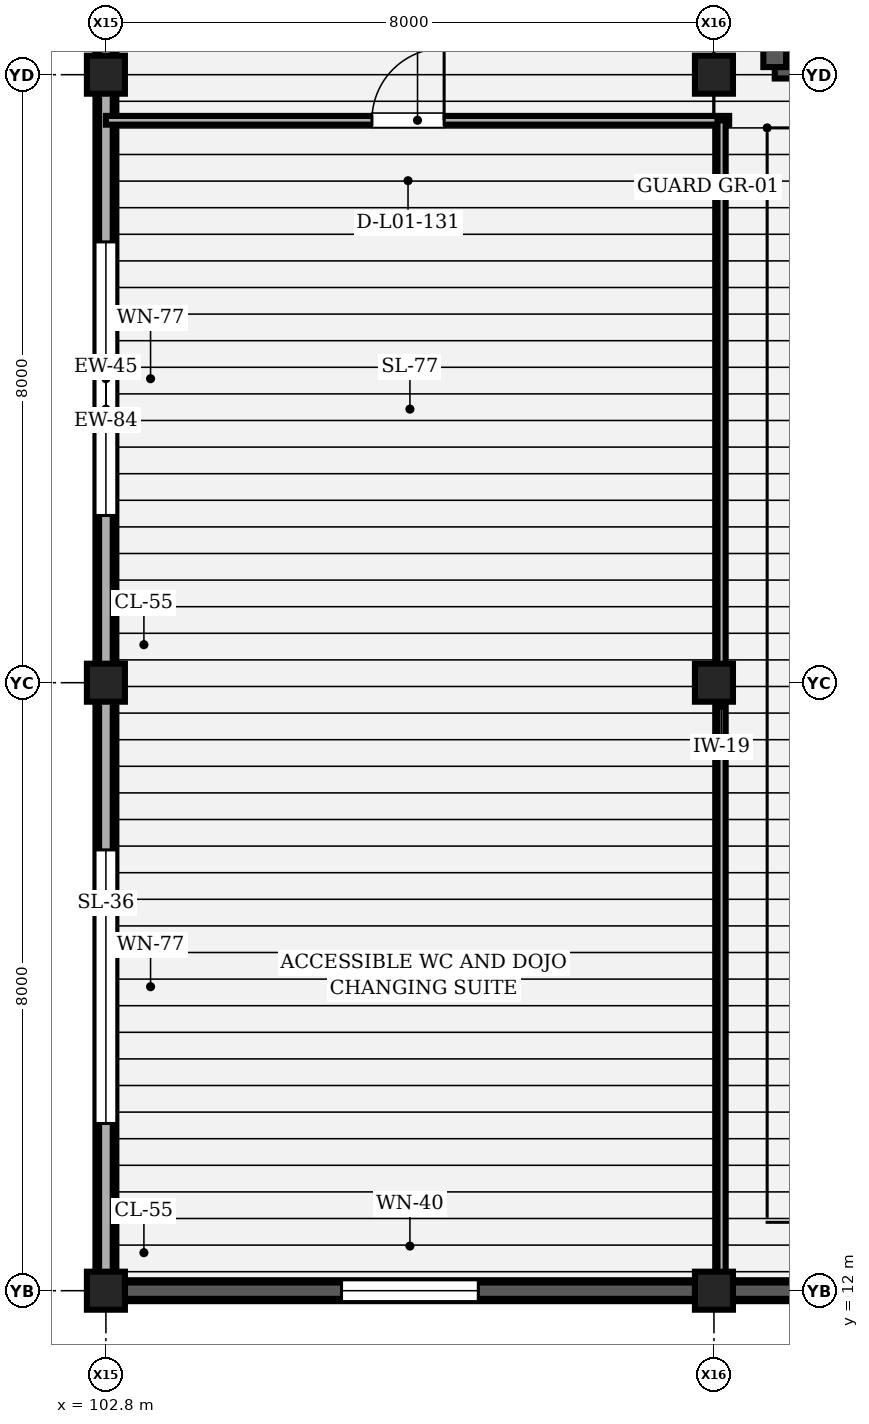
"""IFC4 building model, lengths in metres.
Left out: names, types, materials, properties, quantities, classifications, styles, units other than length and angle.
Written with IfcOpenShell. Run it as: python <this file> out.ifc"""

import sys

from ifc_helpers import new_model, si_unit, direction, frame, frame_2d, origin, origin_2d, place, context, subcontext, project, spatial, polyline, rectangle, outline, extrude, element, fill, save


model = new_model("IFC4")
c1 = context("Model", 3, precision=1e-05, world=origin(), true_north=direction((0.0, 1.0)))
c2 = subcontext(c1, "Body", "Model", "MODEL_VIEW")
j1 = project(units=[si_unit("LENGTHUNIT", "METRE"), si_unit("PLANEANGLEUNIT", "RADIAN")], contexts=[c1])
p1 = place(None, origin())
s1 = spatial("IfcSite", under=j1, at=p1, CompositionType="ELEMENT")
p2 = place(p1, origin())
s2 = spatial("IfcBuilding", under=s1, at=p2, CompositionType="ELEMENT")
p3 = place(p2, frame((0.0, 0.0, 4.8)))
s3 = spatial("IfcBuildingStorey", under=s2, at=p3, CompositionType="ELEMENT", Elevation=4.8)
for number, where, z_axis, x_axis in (
    (1, (102.8, 12.0, 0.0), (0.0, 0.0, 1.0), (1.0, 0.0, 0.0)),
    (2, (102.8, 20.0, 0.0), (0.0, 0.0, 1.0), (1.0, 0.0, 0.0)),
    (3, (102.8, 28.0, 0.0), (0.0, 0.0, 1.0), (1.0, 0.0, 0.0)),
    (4, (110.8, 12.0, 0.0), (0.0, 0.0, 1.0), (1.0, 0.0, 0.0)),
    (5, (110.8, 20.0, 0.0), (0.0, 0.0, 1.0), (1.0, 0.0, 0.0)),
    (6, (110.8, 28.0, 0.0), (0.0, 0.0, 1.0), (1.0, 0.0, 0.0)),
):
    element("IfcColumn", number, at=place(p3, frame(where, z_axis=z_axis, x_axis=x_axis)), inside=s3, PredefinedType="COLUMN", context=c2, shape_type="SweptSolid", body=[
        extrude(rectangle(XDim=0.5, YDim=0.5, at=origin_2d()), origin(), (0.0, 0.0, 1.0), 4.2),
    ])
p4 = place(p3, frame((103.05, 12.0, 0.0), z_axis=(0.0, 0.0, 1.0), x_axis=(1.0, 0.0, 0.0)))
e7 = element("IfcWall", 7, at=p4, inside=s3, PredefinedType="SOLIDWALL", context=c2, shape_type="SweptSolid", body=[
    extrude(rectangle(XDim=7.5, YDim=0.275, at=frame_2d((3.75, 0.0))), origin(), (0.0, 0.0, 1.0), 3.333),
])
p5 = place(p4, frame((2.85, 0.0, 1.6)))
e8 = element("IfcOpeningElement", 8, at=p5, cuts=e7, PredefinedType="OPENING", context=c2, shape_type="SweptSolid", body=[
    extrude(rectangle(XDim=1.8, YDim=0.75, at=frame_2d((0.9, 0.375))), frame((0.0, 0.147, 0.0), z_axis=(0.0, -1.0, 0.0), x_axis=(1.0, 0.0, 0.0)), (0.0, 0.0, 1.0), 0.295),
])
p6 = place(p3, frame((111.05, 12.0, 0.0), z_axis=(0.0, 0.0, 1.0), x_axis=(1.0, 0.0, 0.0)))
e9 = element("IfcWall", 9, at=p6, inside=s3, PredefinedType="SOLIDWALL", context=c2, shape_type="SweptSolid", body=[
    extrude(rectangle(XDim=7.5, YDim=0.275, at=frame_2d((3.75, 0.0))), origin(), (0.0, 0.0, 1.0), 3.333),
])
p7 = place(p6, frame((2.85, 0.0, 1.6)))
e10 = element("IfcOpeningElement", 10, at=p7, cuts=e9, PredefinedType="OPENING", context=c2, shape_type="SweptSolid", body=[
    extrude(rectangle(XDim=1.8, YDim=0.75, at=frame_2d((0.9, 0.375))), frame((0.0, 0.147, 0.0), z_axis=(0.0, -1.0, 0.0), x_axis=(1.0, 0.0, 0.0)), (0.0, 0.0, 1.0), 0.295),
])
p8 = place(p3, frame((102.8, 34.95, 0.0), z_axis=(0.0, 0.0, 1.0), x_axis=(0.0, -1.0, 0.0)))
e11 = element("IfcWall", 11, at=p8, inside=s3, PredefinedType="SOLIDWALL", context=c2, shape_type="SweptSolid", body=[
    extrude(rectangle(XDim=6.7, YDim=0.275, at=frame_2d((3.35, 0.0))), origin(), (0.0, 0.0, 1.0), 3.488),
])
p9 = place(p8, frame((1.55, 0.0, 2.05)))
e12 = element("IfcOpeningElement", 12, at=p9, cuts=e11, PredefinedType="OPENING", context=c2, shape_type="SweptSolid", body=[
    extrude(rectangle(XDim=3.6, YDim=1.2, at=frame_2d((1.8, 0.6))), frame((0.0, 0.147, 0.0), z_axis=(0.0, -1.0, 0.0), x_axis=(1.0, 0.0, 0.0)), (0.0, 0.0, 1.0), 0.295),
])
p10 = place(p3, frame((102.8, 27.75, 0.0), z_axis=(0.0, 0.0, 1.0), x_axis=(0.0, -1.0, 0.0)))
e13 = element("IfcWall", 13, at=p10, inside=s3, PredefinedType="SOLIDWALL", context=c2, shape_type="SweptSolid", body=[
    extrude(rectangle(XDim=7.5, YDim=0.275, at=frame_2d((3.75, 0.0))), origin(), (0.0, 0.0, 1.0), 3.488),
])
p11 = place(p10, frame((1.95, 0.0, 2.05)))
e14 = element("IfcOpeningElement", 14, at=p11, cuts=e13, PredefinedType="OPENING", context=c2, shape_type="SweptSolid", body=[
    extrude(rectangle(XDim=3.6, YDim=1.2, at=frame_2d((1.8, 0.6))), frame((0.0, 0.147, 0.0), z_axis=(0.0, -1.0, 0.0), x_axis=(1.0, 0.0, 0.0)), (0.0, 0.0, 1.0), 0.295),
])
p12 = place(p3, frame((102.8, 19.75, 0.0), z_axis=(0.0, 0.0, 1.0), x_axis=(0.0, -1.0, 0.0)))
e15 = element("IfcWall", 15, at=p12, inside=s3, PredefinedType="SOLIDWALL", context=c2, shape_type="SweptSolid", body=[
    extrude(rectangle(XDim=7.5, YDim=0.275, at=frame_2d((3.75, 0.0))), origin(), (0.0, 0.0, 1.0), 3.488),
])
p13 = place(p12, frame((1.95, 0.0, 2.05)))
e16 = element("IfcOpeningElement", 16, at=p13, cuts=e15, PredefinedType="OPENING", context=c2, shape_type="SweptSolid", body=[
    extrude(rectangle(XDim=3.6, YDim=1.2, at=frame_2d((1.8, 0.6))), frame((0.0, 0.147, 0.0), z_axis=(0.0, -1.0, 0.0), x_axis=(1.0, 0.0, 0.0)), (0.0, 0.0, 1.0), 0.295),
])
p14 = place(p3, frame((102.8, 12.0, 4.2), z_axis=(0.0, 0.0, 1.0), x_axis=(1.0, 0.0, 0.0)))
e17 = element("IfcWall", 17, at=p14, inside=s3, PredefinedType="SOLIDWALL", context=c2, shape_type="SweptSolid", body=[
    extrude(outline(polyline([(0.0, 0.0), (16.0, 0.0), (16.0, 0.05), (8.0, 3.55), (0.0, 0.05), (0.0, 0.0)])), frame((0.0, 0.107, 0.0), z_axis=(0.0, -1.0, 0.0), x_axis=(1.0, 0.0, 0.0)), (0.0, 0.0, 1.0), 0.215),
])
p15 = place(p3, frame((102.8, 12.0, 4.2), z_axis=(0.0, 0.0, 1.0), x_axis=(0.0, 1.0, 0.0)))
e18 = element("IfcWall", 18, at=p15, inside=s3, PredefinedType="PARAPET", context=c2, shape_type="SweptSolid", body=[
    extrude(rectangle(XDim=23.2, YDim=0.18, at=frame_2d((11.6, 0.0))), origin(), (0.0, 0.0, 1.0), 0.85),
])
p16 = place(p3, frame((111.6, 28.1, 0.0), z_axis=(0.0, 0.0, 1.0), x_axis=(1.0, 0.0, 0.0)))
e19 = element("IfcWall", 19, at=p16, inside=s3, PredefinedType="SHEAR", context=c2, shape_type="SweptSolid", body=[
    extrude(rectangle(XDim=3.12, YDim=0.3, at=frame_2d((1.56, 0.0))), origin(), (0.0, 0.0, 1.0), 4.2),
])
p17 = place(p16, frame((0.985, 0.0, 0.0)))
e20 = element("IfcOpeningElement", 20, at=p17, cuts=e19, PredefinedType="OPENING", context=c2, shape_type="SweptSolid", body=[
    extrude(rectangle(XDim=1.15, YDim=2.15, at=frame_2d((0.575, 1.075))), frame((0.0, 0.16, 0.0), z_axis=(0.0, -1.0, 0.0), x_axis=(1.0, 0.0, 0.0)), (0.0, 0.0, 1.0), 0.32),
])
p18 = place(p3, frame((111.6, 35.2, 0.0), z_axis=(0.0, 0.0, 1.0), x_axis=(0.0, -1.0, 0.0)))
e21 = element("IfcWall", 21, at=p18, inside=s3, PredefinedType="SHEAR", context=c2, shape_type="SweptSolid", body=[
    extrude(rectangle(XDim=7.1, YDim=0.3, at=frame_2d((3.55, 0.0))), origin(), (0.0, 0.0, 1.0), 4.2),
])
p19 = place(p3, frame((102.8, 27.4, 0.0), z_axis=(0.0, 0.0, 1.0), x_axis=(1.0, 0.0, 0.0)))
e22 = element("IfcWall", 22, at=p19, inside=s3, PredefinedType="PARTITIONING", context=c2, shape_type="SweptSolid", body=[
    extrude(rectangle(XDim=8.2, YDim=0.115, at=frame_2d((4.1, 0.0))), origin(), (0.0, 0.0, 1.0), 3.318),
])
p20 = place(p19, frame((3.5, 0.0, 0.0)))
e23 = element("IfcOpeningElement", 23, at=p20, cuts=e22, PredefinedType="OPENING", context=c2, shape_type="SweptSolid", body=[
    extrude(rectangle(XDim=0.95, YDim=2.15, at=frame_2d((0.475, 1.075))), frame((0.0, 0.067, 0.0), z_axis=(0.0, -1.0, 0.0), x_axis=(1.0, 0.0, 0.0)), (0.0, 0.0, 1.0), 0.135),
])
p21 = place(p3, frame((110.9, 12.0, 0.0), z_axis=(0.0, 0.0, 1.0), x_axis=(0.0, 1.0, 0.0)))
e24 = element("IfcWall", 24, at=p21, inside=s3, PredefinedType="PARTITIONING", context=c2, shape_type="SweptSolid", body=[
    extrude(rectangle(XDim=15.4, YDim=0.108, at=frame_2d((7.7, 0.0))), origin(), (0.0, 0.0, 1.0), 3.318),
])
p22 = place(p5, origin())
e25 = element("IfcWindow", 25, at=p22, inside=s3, PartitioningType="SINGLE_PANEL", PredefinedType="WINDOW", context=c2, shape_type="SweptSolid", body=[
    extrude(rectangle(XDim=1.8, YDim=0.75, at=frame_2d((0.9, 0.375))), frame((0.0, 0.03, 0.0), z_axis=(0.0, -1.0, 0.0), x_axis=(1.0, 0.0, 0.0)), (0.0, 0.0, 1.0), 0.06),
])
fill(e8, e25)
p23 = place(p11, origin())
e26 = element("IfcWindow", 26, at=p23, inside=s3, PartitioningType="SINGLE_PANEL", PredefinedType="WINDOW", context=c2, shape_type="SweptSolid", body=[
    extrude(rectangle(XDim=3.6, YDim=1.2, at=frame_2d((1.8, 0.6))), frame((0.0, 0.03, 0.0), z_axis=(0.0, -1.0, 0.0), x_axis=(1.0, 0.0, 0.0)), (0.0, 0.0, 1.0), 0.06),
])
fill(e14, e26)
p24 = place(p13, origin())
e27 = element("IfcWindow", 27, at=p24, inside=s3, PartitioningType="SINGLE_PANEL", PredefinedType="WINDOW", context=c2, shape_type="SweptSolid", body=[
    extrude(rectangle(XDim=3.6, YDim=1.2, at=frame_2d((1.8, 0.6))), frame((0.0, 0.03, 0.0), z_axis=(0.0, -1.0, 0.0), x_axis=(1.0, 0.0, 0.0)), (0.0, 0.0, 1.0), 0.06),
])
fill(e16, e27)
p25 = place(p20, origin())
e28 = element("IfcDoor", 28, at=p25, inside=s3, OperationType="SINGLE_SWING_RIGHT", PredefinedType="DOOR", context=c2, shape_type="SweptSolid", body=[
    extrude(rectangle(XDim=0.95, YDim=2.15, at=frame_2d((0.475, 1.075))), frame((0.0, 0.025, 0.0), z_axis=(0.0, -1.0, 0.0), x_axis=(1.0, 0.0, 0.0)), (0.0, 0.0, 1.0), 0.05),
])
fill(e23, e28)
save(model, sys.argv[1])
